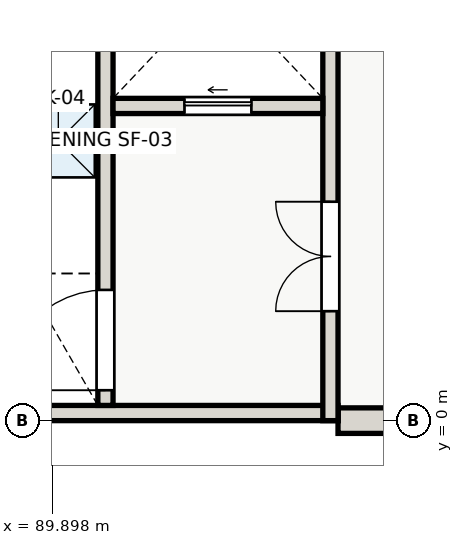
"""IFC4 building model, lengths in metres.
Left out: names, types, materials, properties, quantities, classifications, styles, units other than length and angle.
Written with IfcOpenShell. Run it as: python <this file> out.ifc"""

import sys

from ifc_helpers import new_model, si_unit, direction, frame, frame_2d, origin, origin_2d, place, context, subcontext, project, spatial, rectangle, extrude, element, fill, save


model = new_model("IFC4")
c1 = context("Model", 3, precision=1e-05, world=origin(), true_north=direction((0.0, 1.0)))
c2 = subcontext(c1, "Body", "Model", "MODEL_VIEW")
j1 = project(units=[si_unit("LENGTHUNIT", "METRE"), si_unit("PLANEANGLEUNIT", "RADIAN")], contexts=[c1])
p1 = place(None, origin())
s1 = spatial("IfcSite", under=j1, at=p1, CompositionType="ELEMENT")
p2 = place(p1, origin())
s2 = spatial("IfcBuilding", under=s1, at=p2, CompositionType="ELEMENT")
p3 = place(p2, frame((0.0, 0.0, 4.2)))
s3 = spatial("IfcBuildingStorey", under=s2, at=p3, CompositionType="ELEMENT", Elevation=4.2)
p4 = place(p3, frame((96.0, 0.0, 0.0), z_axis=(0.0, 0.0, 1.0), x_axis=(-1.0, 0.0, 0.0)))
e1 = element("IfcWall", 1, at=p4, inside=s3, PredefinedType="SOLIDWALL", context=c2, shape_type="SweptSolid", body=[
    extrude(rectangle(XDim=1.4, YDim=0.42, at=frame_2d((0.7, 0.0))), origin(), (0.0, 0.0, 1.0), 3.57),
])
p5 = place(p3, frame((94.6, 0.125, 0.0), z_axis=(0.0, 0.0, 1.0), x_axis=(-1.0, 0.0, 0.0)))
e2 = element("IfcWall", 2, at=p5, inside=s3, PredefinedType="SHEAR", context=c2, shape_type="SweptSolid", body=[
    extrude(rectangle(XDim=9.2, YDim=0.25, at=frame_2d((4.6, 0.0))), origin(), (0.0, 0.0, 1.0), 5.6),
])
p6 = place(p3, frame((94.475, 0.0, 0.0), z_axis=(0.0, 0.0, 1.0), x_axis=(0.0, 1.0, 0.0)))
e3 = element("IfcWall", 3, at=p6, inside=s3, PredefinedType="SHEAR", context=c2, shape_type="SweptSolid", body=[
    extrude(rectangle(XDim=9.2, YDim=0.25, at=frame_2d((4.6, 0.0))), origin(), (0.0, 0.0, 1.0), 5.6),
])
p7 = place(p6, frame((1.8, 0.0, 0.0)))
e4 = element("IfcOpeningElement", 4, at=p7, cuts=e3, PredefinedType="OPENING", context=c2, shape_type="SweptSolid", body=[
    extrude(rectangle(XDim=1.8, YDim=2.15, at=frame_2d((0.9, 1.075))), frame((0.0, 0.135, 0.0), z_axis=(0.0, -1.0, 0.0), x_axis=(1.0, 0.0, 0.0)), (0.0, 0.0, 1.0), 0.27),
])
p8 = place(p3, frame((90.775, 0.25, 0.0), z_axis=(0.0, 0.0, 1.0), x_axis=(0.0, 1.0, 0.0)))
e5 = element("IfcWall", 5, at=p8, inside=s3, PredefinedType="SHEAR", context=c2, shape_type="SweptSolid", body=[
    extrude(rectangle(XDim=8.7, YDim=0.25, at=frame_2d((4.35, 0.0))), origin(), (0.0, 0.0, 1.0), 5.6),
])
p9 = place(p8, frame((0.25, 0.0, 0.0)))
e6 = element("IfcOpeningElement", 6, at=p9, cuts=e5, PredefinedType="OPENING", context=c2, shape_type="SweptSolid", body=[
    extrude(rectangle(XDim=1.65, YDim=2.1, at=frame_2d((0.825, 1.05))), frame((0.0, 0.135, 0.0), z_axis=(0.0, -1.0, 0.0), x_axis=(1.0, 0.0, 0.0)), (0.0, 0.0, 1.0), 0.27),
])
p10 = place(p3, frame((90.9, 5.175, 0.0), z_axis=(0.0, 0.0, 1.0), x_axis=(1.0, 0.0, 0.0)))
e7 = element("IfcWall", 7, at=p10, inside=s3, PredefinedType="SHEAR", context=c2, shape_type="SweptSolid", body=[
    extrude(rectangle(XDim=3.45, YDim=0.25, at=frame_2d((1.725, 0.0))), origin(), (0.0, 0.0, 1.0), 5.6),
])
p11 = place(p10, frame((1.175, 0.0, 0.0)))
e8 = element("IfcOpeningElement", 8, at=p11, cuts=e7, PredefinedType="OPENING", context=c2, shape_type="SweptSolid", body=[
    extrude(rectangle(XDim=1.1, YDim=2.1, at=frame_2d((0.55, 1.05))), frame((0.0, 0.135, 0.0), z_axis=(0.0, -1.0, 0.0), x_axis=(1.0, 0.0, 0.0)), (0.0, 0.0, 1.0), 0.27),
])
p12 = place(p2, frame((0.0, 0.0, 21.0)))
p13 = place(p12, frame((0.0, 0.0, -11.42)))
p14 = place(p13, frame((90.0, 4.6, 0.0)))
p15 = place(p14, frame((0.0, 0.0, 0.16)))
e9 = element("IfcWindow", 9, at=p15, inside=s3, PartitioningType="SINGLE_PANEL", PredefinedType="SKYLIGHT", context=c2, shape_type="SweptSolid", body=[
    extrude(rectangle(XDim=1.2, YDim=1.2, at=origin_2d()), origin(), (0.0, 0.0, 1.0), 0.06),
])
p16 = place(p7, origin())
e10 = element("IfcDoor", 10, at=p16, inside=s3, OperationType="DOUBLE_DOOR_SINGLE_SWING", PredefinedType="DOOR", context=c2, shape_type="SweptSolid", body=[
    extrude(rectangle(XDim=1.8, YDim=2.15, at=frame_2d((0.9, 1.075))), frame((0.0, 0.025, 0.0), z_axis=(0.0, -1.0, 0.0), x_axis=(1.0, 0.0, 0.0)), (0.0, 0.0, 1.0), 0.05),
])
fill(e4, e10)
p17 = place(p9, origin())
e11 = element("IfcDoor", 11, at=p17, inside=s3, OperationType="SINGLE_SWING_LEFT", PredefinedType="DOOR", context=c2, shape_type="SweptSolid", body=[
    extrude(rectangle(XDim=1.65, YDim=2.1, at=frame_2d((0.825, 1.05))), frame((0.0, 0.025, 0.0), z_axis=(0.0, -1.0, 0.0), x_axis=(1.0, 0.0, 0.0)), (0.0, 0.0, 1.0), 0.05),
])
fill(e6, e11)
p18 = place(p11, origin())
e12 = element("IfcDoor", 12, at=p18, inside=s3, OperationType="SLIDING_TO_LEFT", PredefinedType="DOOR", context=c2, shape_type="SweptSolid", body=[
    extrude(rectangle(XDim=1.1, YDim=2.1, at=frame_2d((0.55, 1.05))), frame((0.0, 0.025, 0.0), z_axis=(0.0, -1.0, 0.0), x_axis=(1.0, 0.0, 0.0)), (0.0, 0.0, 1.0), 0.05),
])
fill(e8, e12)
save(model, sys.argv[1])
